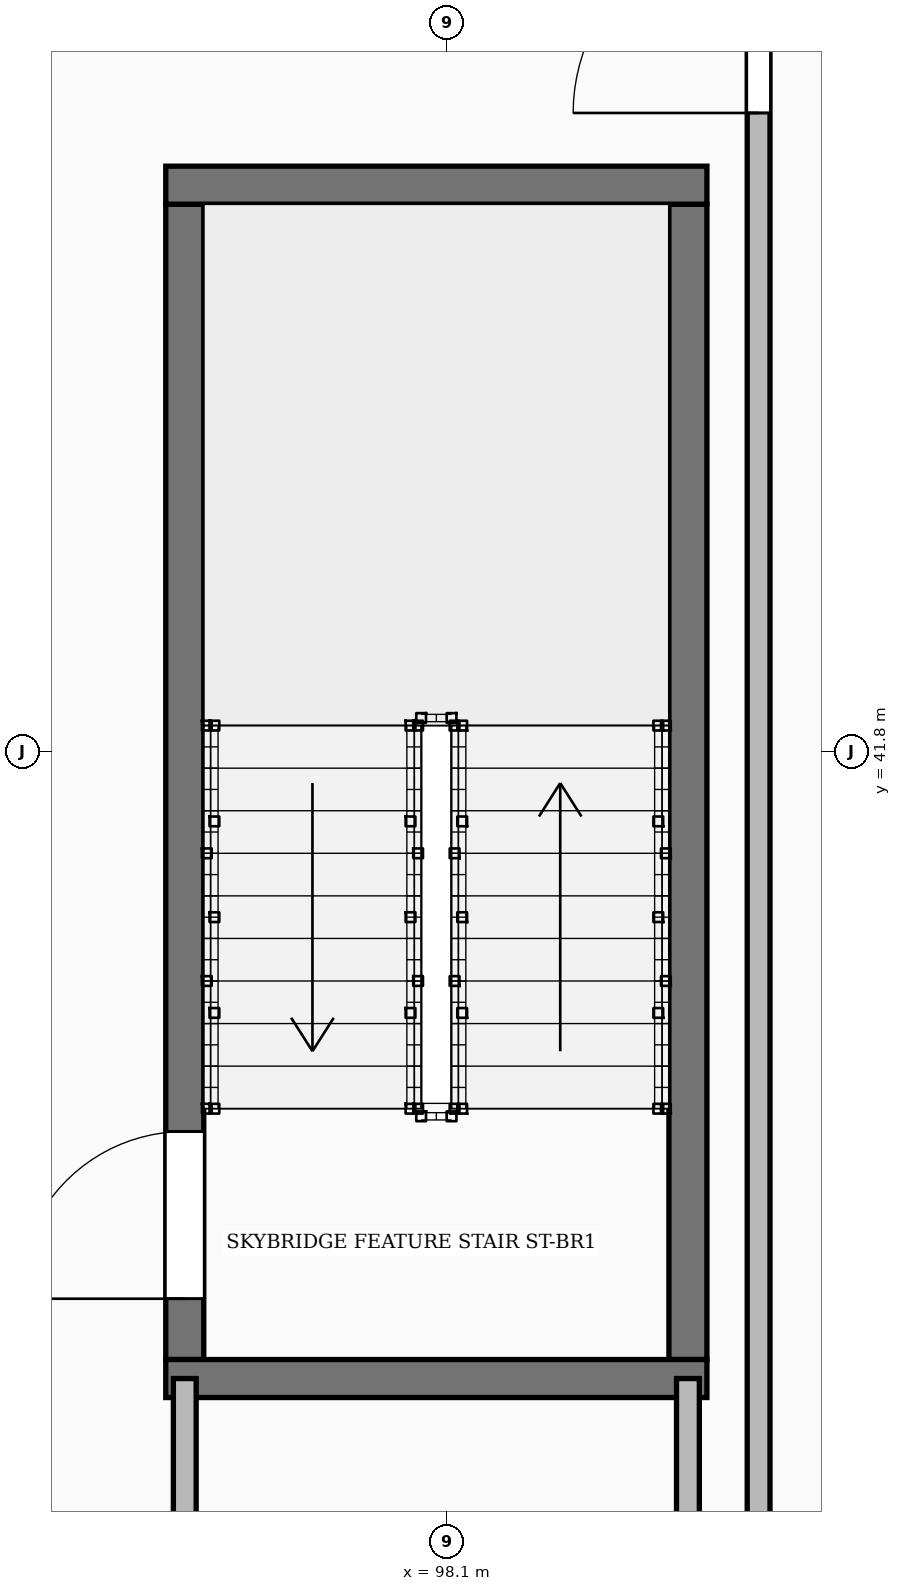
"""IFC4 building model, lengths in metres.
Left out: names, types, materials, properties, quantities, classifications, styles, units other than length and angle.
Written with IfcOpenShell. Run it as: python <this file> out.ifc"""

import sys

from ifc_helpers import new_model, si_unit, direction, frame, frame_2d, origin, place, context, subcontext, project, spatial, rectangle, extrude, element, fill, save


model = new_model("IFC4")
c1 = context("Model", 3, precision=1e-05, world=origin(), true_north=direction((0.0, 1.0)))
c2 = subcontext(c1, "Body", "Model", "MODEL_VIEW")
j1 = project(units=[si_unit("LENGTHUNIT", "METRE"), si_unit("PLANEANGLEUNIT", "RADIAN")], contexts=[c1])
p1 = place(None, origin())
s1 = spatial("IfcSite", under=j1, at=p1, CompositionType="ELEMENT")
p2 = place(p1, origin())
s2 = spatial("IfcBuilding", under=s1, at=p2, CompositionType="ELEMENT")
p3 = place(p2, frame((0.0, 0.0, 146.5)))
s3 = spatial("IfcBuildingStorey", under=s2, at=p3, CompositionType="ELEMENT", Elevation=146.5)
p4 = place(p3, frame((96.375, 37.8, 0.0), z_axis=(0.0, 0.0, 1.0), x_axis=(0.0, 1.0, 0.0)))
e1 = element("IfcWall", 1, at=p4, inside=s3, PredefinedType="SHEAR", context=c2, shape_type="SweptSolid", body=[
    extrude(rectangle(XDim=7.6, YDim=0.25, at=frame_2d((3.8, 0.0))), origin(), (0.0, 0.0, 1.0), 3.6),
])
p5 = place(p4, frame((0.4, 0.0, 0.0)))
e2 = element("IfcOpeningElement", 2, at=p5, cuts=e1, PredefinedType="OPENING", context=c2, shape_type="SweptSolid", body=[
    extrude(rectangle(XDim=1.1, YDim=2.1, at=frame_2d((0.55, 1.05))), frame((0.0, 0.135, 0.0), z_axis=(0.0, -1.0, 0.0), x_axis=(1.0, 0.0, 0.0)), (0.0, 0.0, 1.0), 0.27),
])
p6 = place(p3, frame((99.685, 37.8, 0.0), z_axis=(0.0, 0.0, 1.0), x_axis=(0.0, 1.0, 0.0)))
e3 = element("IfcWall", 3, at=p6, inside=s3, PredefinedType="SHEAR", context=c2, shape_type="SweptSolid", body=[
    extrude(rectangle(XDim=7.6, YDim=0.25, at=frame_2d((3.8, 0.0))), origin(), (0.0, 0.0, 1.0), 3.6),
])
for number, where, z_axis, x_axis in (
    (4, (96.25, 37.675, 0.0), (0.0, 0.0, 1.0), (1.0, 0.0, 0.0)),
    (5, (96.25, 45.525, 0.0), (0.0, 0.0, 1.0), (1.0, 0.0, 0.0)),
):
    element("IfcWall", number, at=place(p3, frame(where, z_axis=z_axis, x_axis=x_axis)), inside=s3, PredefinedType="SHEAR", context=c2, shape_type="SweptSolid", body=[
        extrude(rectangle(XDim=3.56, YDim=0.25, at=frame_2d((1.78, 0.0))), origin(), (0.0, 0.0, 1.0), 3.6),
    ])
p7 = place(p3, frame((96.375, 32.95, 0.0), z_axis=(0.0, 0.0, 1.0), x_axis=(0.0, 1.0, 0.0)))
e6 = element("IfcWall", 6, at=p7, inside=s3, PredefinedType="PARTITIONING", context=c2, shape_type="SweptSolid", body=[
    extrude(rectangle(XDim=4.725, YDim=0.15, at=frame_2d((2.363, 0.0))), origin(), (0.0, 0.0, 1.0), 2.383),
])
p8 = place(p7, frame((1.6, 0.0, 0.0)))
e7 = element("IfcOpeningElement", 7, at=p8, cuts=e6, PredefinedType="OPENING", context=c2, shape_type="SweptSolid", body=[
    extrude(rectangle(XDim=0.96, YDim=2.1, at=frame_2d((0.48, 1.05))), frame((0.0, 0.085, 0.0), z_axis=(0.0, -1.0, 0.0), x_axis=(1.0, 0.0, 0.0)), (0.0, 0.0, 1.0), 0.17),
])
p9 = place(p3, frame((99.685, 32.95, 0.0), z_axis=(0.0, 0.0, 1.0), x_axis=(0.0, 1.0, 0.0)))
e8 = element("IfcWall", 8, at=p9, inside=s3, PredefinedType="PARTITIONING", context=c2, shape_type="SweptSolid", body=[
    extrude(rectangle(XDim=4.725, YDim=0.15, at=frame_2d((2.363, 0.0))), origin(), (0.0, 0.0, 1.0), 2.383),
])
p10 = place(p3, frame((100.15, 32.9, 0.0), z_axis=(0.0, 0.0, 1.0), x_axis=(0.0, 1.0, 0.0)))
e9 = element("IfcWall", 9, at=p10, inside=s3, PredefinedType="PARTITIONING", context=c2, shape_type="SweptSolid", body=[
    extrude(rectangle(XDim=17.8, YDim=0.15, at=frame_2d((8.9, 0.0))), origin(), (0.0, 0.0, 1.0), 3.31),
])
p11 = place(p10, frame((13.1, 0.0, 0.0)))
e10 = element("IfcOpeningElement", 10, at=p11, cuts=e9, PredefinedType="OPENING", context=c2, shape_type="SweptSolid", body=[
    extrude(rectangle(XDim=1.22, YDim=2.18, at=frame_2d((0.61, 1.09))), frame((0.0, 0.085, 0.0), z_axis=(0.0, -1.0, 0.0), x_axis=(1.0, 0.0, 0.0)), (0.0, 0.0, 1.0), 0.17),
])
p12 = place(p5, origin())
e11 = element("IfcDoor", 11, at=p12, inside=s3, OperationType="SINGLE_SWING_LEFT", PredefinedType="DOOR", context=c2, shape_type="SweptSolid", body=[
    extrude(rectangle(XDim=1.1, YDim=2.1, at=frame_2d((0.55, 1.05))), frame((0.0, 0.025, 0.0), z_axis=(0.0, -1.0, 0.0), x_axis=(1.0, 0.0, 0.0)), (0.0, 0.0, 1.0), 0.05),
])
fill(e2, e11)
p13 = place(p11, origin())
e12 = element("IfcDoor", 12, at=p13, inside=s3, OperationType="SINGLE_SWING_LEFT", PredefinedType="DOOR", context=c2, shape_type="SweptSolid", body=[
    extrude(rectangle(XDim=1.22, YDim=2.18, at=frame_2d((0.61, 1.09))), frame((0.0, 0.025, 0.0), z_axis=(0.0, -1.0, 0.0), x_axis=(1.0, 0.0, 0.0)), (0.0, 0.0, 1.0), 0.05),
])
fill(e10, e12)
save(model, sys.argv[1])
